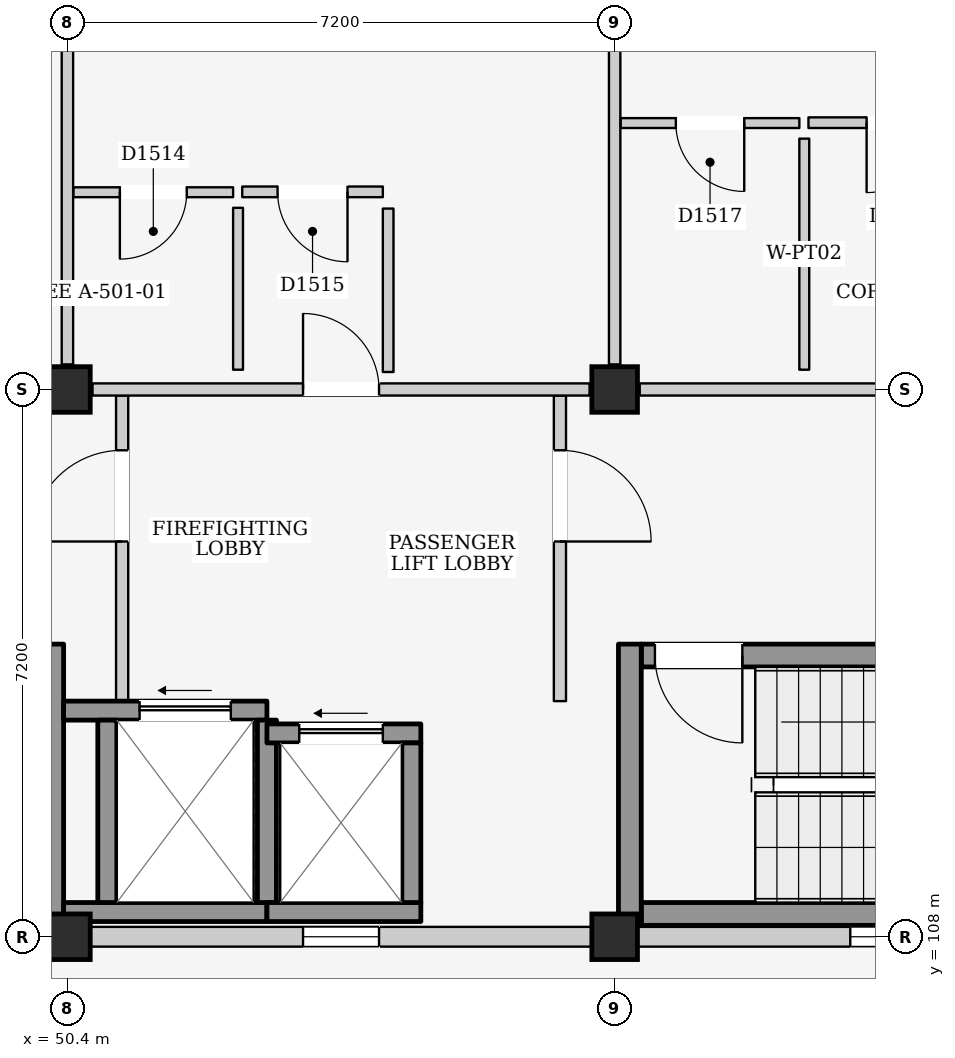
"""IFC4 building model, lengths in metres.
Left out: names, types, materials, properties, quantities, classifications, styles, units other than length and angle.
Written with IfcOpenShell. Run it as: python <this file> out.ifc"""

import sys

from ifc_helpers import new_model, si_unit, direction, frame, frame_2d, origin, origin_2d, place, context, subcontext, project, spatial, rectangle, extrude, element, fill, save


model = new_model("IFC4")
c1 = context("Model", 3, precision=1e-05, world=origin(), true_north=direction((0.0, 1.0)))
c2 = subcontext(c1, "Body", "Model", "MODEL_VIEW")
j1 = project(units=[si_unit("LENGTHUNIT", "METRE"), si_unit("PLANEANGLEUNIT", "RADIAN")], contexts=[c1])
p1 = place(None, origin())
s1 = spatial("IfcSite", under=j1, at=p1, CompositionType="ELEMENT")
p2 = place(p1, origin())
s2 = spatial("IfcBuilding", under=s1, at=p2, CompositionType="ELEMENT")
p3 = place(p2, frame((0.0, 0.0, 25.1)))
s3 = spatial("IfcBuildingStorey", under=s2, at=p3, CompositionType="ELEMENT", Elevation=25.1)
for number, where, z_axis, x_axis in (
    (1, (50.4, 108.0, 0.0), (0.0, 0.0, 1.0), (1.0, 0.0, 0.0)),
    (2, (50.4, 115.2, 0.0), (0.0, 0.0, 1.0), (1.0, 0.0, 0.0)),
    (3, (57.6, 108.0, 0.0), (0.0, 0.0, 1.0), (1.0, 0.0, 0.0)),
    (4, (57.6, 115.2, 0.0), (0.0, 0.0, 1.0), (1.0, 0.0, 0.0)),
):
    element("IfcColumn", number, at=place(p3, frame(where, z_axis=z_axis, x_axis=x_axis)), inside=s3, PredefinedType="COLUMN", context=c2, shape_type="SweptSolid", body=[
        extrude(rectangle(XDim=0.6, YDim=0.6, at=origin_2d()), origin(), (0.0, 0.0, 1.0), 3.2),
    ])
p4 = place(p3, frame((50.7, 108.0, 0.0), z_axis=(0.0, 0.0, 1.0), x_axis=(1.0, 0.0, 0.0)))
e5 = element("IfcWall", 5, at=p4, inside=s3, PredefinedType="ELEMENTEDWALL", context=c2, shape_type="SweptSolid", body=[
    extrude(rectangle(XDim=6.6, YDim=0.26, at=frame_2d((3.3, 0.0))), origin(), (0.0, 0.0, 1.0), 2.325),
])
p5 = place(p4, frame((2.8, 0.0, 1.2)))
e6 = element("IfcOpeningElement", 6, at=p5, cuts=e5, PredefinedType="OPENING", context=c2, shape_type="SweptSolid", body=[
    extrude(rectangle(XDim=1.0, YDim=0.9, at=frame_2d((0.5, 0.45))), frame((0.0, 0.145, 0.0), z_axis=(0.0, -1.0, 0.0), x_axis=(1.0, 0.0, 0.0)), (0.0, 0.0, 1.0), 0.29),
])
p6 = place(p3, frame((57.9, 108.0, 0.0), z_axis=(0.0, 0.0, 1.0), x_axis=(1.0, 0.0, 0.0)))
e7 = element("IfcWall", 7, at=p6, inside=s3, PredefinedType="ELEMENTEDWALL", context=c2, shape_type="SweptSolid", body=[
    extrude(rectangle(XDim=6.6, YDim=0.26, at=frame_2d((3.3, 0.0))), origin(), (0.0, 0.0, 1.0), 2.325),
])
p7 = place(p6, frame((2.8, 0.0, 1.2)))
e8 = element("IfcOpeningElement", 8, at=p7, cuts=e7, PredefinedType="OPENING", context=c2, shape_type="SweptSolid", body=[
    extrude(rectangle(XDim=1.0, YDim=0.9, at=frame_2d((0.5, 0.45))), frame((0.0, 0.145, 0.0), z_axis=(0.0, -1.0, 0.0), x_axis=(1.0, 0.0, 0.0)), (0.0, 0.0, 1.0), 0.29),
])
p8 = place(p3, frame((50.2, 108.15, 0.0), z_axis=(0.0, 0.0, 1.0), x_axis=(0.0, 1.0, 0.0)))
e9 = element("IfcWall", 9, at=p8, inside=s3, PredefinedType="SHEAR", context=c2, shape_type="SweptSolid", body=[
    extrude(rectangle(XDim=3.7, YDim=0.3, at=frame_2d((1.85, 0.0))), origin(), (0.0, 0.0, 1.0), 2.99),
])
p9 = place(p3, frame((51.12, 111.1, 0.0), z_axis=(0.0, 0.0, 1.0), x_axis=(0.0, 1.0, 0.0)))
e10 = element("IfcWall", 10, at=p9, inside=s3, PredefinedType="PARTITIONING", context=c2, shape_type="SweptSolid", body=[
    extrude(rectangle(XDim=4.02, YDim=0.16, at=frame_2d((2.01, 0.0))), origin(), (0.0, 0.0, 1.0), 2.99),
])
p10 = place(p9, frame((2.1, 0.0, 0.0)))
e11 = element("IfcOpeningElement", 11, at=p10, cuts=e10, PredefinedType="OPENING", context=c2, shape_type="SweptSolid", body=[
    extrude(rectangle(XDim=1.2, YDim=2.2, at=frame_2d((0.6, 1.1))), frame((0.0, 0.095, 0.0), z_axis=(0.0, -1.0, 0.0), x_axis=(1.0, 0.0, 0.0)), (0.0, 0.0, 1.0), 0.19),
])
p11 = place(p3, frame((56.88, 111.1, 0.0), z_axis=(0.0, 0.0, 1.0), x_axis=(0.0, 1.0, 0.0)))
e12 = element("IfcWall", 12, at=p11, inside=s3, PredefinedType="PARTITIONING", context=c2, shape_type="SweptSolid", body=[
    extrude(rectangle(XDim=4.02, YDim=0.16, at=frame_2d((2.01, 0.0))), origin(), (0.0, 0.0, 1.0), 2.99),
])
p12 = place(p11, frame((2.1, 0.0, 0.0)))
e13 = element("IfcOpeningElement", 13, at=p12, cuts=e12, PredefinedType="OPENING", context=c2, shape_type="SweptSolid", body=[
    extrude(rectangle(XDim=1.2, YDim=2.2, at=frame_2d((0.6, 1.1))), frame((0.0, 0.095, 0.0), z_axis=(0.0, -1.0, 0.0), x_axis=(1.0, 0.0, 0.0)), (0.0, 0.0, 1.0), 0.19),
])
p13 = place(p3, frame((50.35, 108.325, 0.0), z_axis=(0.0, 0.0, 1.0), x_axis=(1.0, 0.0, 0.0)))
e14 = element("IfcWall", 14, at=p13, inside=s3, PredefinedType="SHEAR", context=c2, shape_type="SweptSolid", body=[
    extrude(rectangle(XDim=2.675, YDim=0.25, at=frame_2d((1.337, 0.0))), origin(), (0.0, 0.0, 1.0), 2.99),
])
p14 = place(p3, frame((50.35, 110.975, 0.0), z_axis=(0.0, 0.0, 1.0), x_axis=(1.0, 0.0, 0.0)))
e15 = element("IfcWall", 15, at=p14, inside=s3, PredefinedType="SHEAR", context=c2, shape_type="SweptSolid", body=[
    extrude(rectangle(XDim=2.675, YDim=0.25, at=frame_2d((1.337, 0.0))), origin(), (0.0, 0.0, 1.0), 2.99),
])
p15 = place(p14, frame((1.0, 0.0, 0.0)))
e16 = element("IfcOpeningElement", 16, at=p15, cuts=e15, PredefinedType="OPENING", context=c2, shape_type="SweptSolid", body=[
    extrude(rectangle(XDim=1.2, YDim=2.25, at=frame_2d((0.6, 1.125))), frame((0.0, 0.14, 0.0), z_axis=(0.0, -1.0, 0.0), x_axis=(1.0, 0.0, 0.0)), (0.0, 0.0, 1.0), 0.28),
])
for number, where, z_axis, x_axis in (
    (17, (50.925, 108.45, 0.0), (0.0, 0.0, 1.0), (0.0, 1.0, 0.0)),
    (18, (53.025, 108.45, 0.0), (0.0, 0.0, 1.0), (0.0, 1.0, 0.0)),
):
    element("IfcWall", number, at=place(p3, frame(where, z_axis=z_axis, x_axis=x_axis)), inside=s3, PredefinedType="SHEAR", context=c2, shape_type="SweptSolid", body=[
        extrude(rectangle(XDim=2.4, YDim=0.25, at=frame_2d((1.2, 0.0))), origin(), (0.0, 0.0, 1.0), 2.99),
    ])
p16 = place(p3, frame((53.025, 108.325, 0.0), z_axis=(0.0, 0.0, 1.0), x_axis=(1.0, 0.0, 0.0)))
e19 = element("IfcWall", 19, at=p16, inside=s3, PredefinedType="SHEAR", context=c2, shape_type="SweptSolid", body=[
    extrude(rectangle(XDim=2.025, YDim=0.25, at=frame_2d((1.013, 0.0))), origin(), (0.0, 0.0, 1.0), 2.99),
])
p17 = place(p3, frame((53.025, 110.675, 0.0), z_axis=(0.0, 0.0, 1.0), x_axis=(1.0, 0.0, 0.0)))
e20 = element("IfcWall", 20, at=p17, inside=s3, PredefinedType="SHEAR", context=c2, shape_type="SweptSolid", body=[
    extrude(rectangle(XDim=2.025, YDim=0.25, at=frame_2d((1.013, 0.0))), origin(), (0.0, 0.0, 1.0), 2.99),
])
p18 = place(p17, frame((0.425, 0.0, 0.0)))
e21 = element("IfcOpeningElement", 21, at=p18, cuts=e20, PredefinedType="OPENING", context=c2, shape_type="SweptSolid", body=[
    extrude(rectangle(XDim=1.1, YDim=2.15, at=frame_2d((0.55, 1.075))), frame((0.0, 0.14, 0.0), z_axis=(0.0, -1.0, 0.0), x_axis=(1.0, 0.0, 0.0)), (0.0, 0.0, 1.0), 0.28),
])
p19 = place(p3, frame((54.925, 108.45, 0.0), z_axis=(0.0, 0.0, 1.0), x_axis=(0.0, 1.0, 0.0)))
e22 = element("IfcWall", 22, at=p19, inside=s3, PredefinedType="SHEAR", context=c2, shape_type="SweptSolid", body=[
    extrude(rectangle(XDim=2.1, YDim=0.25, at=frame_2d((1.05, 0.0))), origin(), (0.0, 0.0, 1.0), 2.99),
])
p20 = place(p3, frame((57.95, 108.3, 0.0), z_axis=(0.0, 0.0, 1.0), x_axis=(1.0, 0.0, 0.0)))
e23 = element("IfcWall", 23, at=p20, inside=s3, PredefinedType="SHEAR", context=c2, shape_type="SweptSolid", body=[
    extrude(rectangle(XDim=6.5, YDim=0.3, at=frame_2d((3.25, 0.0))), origin(), (0.0, 0.0, 1.0), 2.99),
])
p21 = place(p3, frame((57.95, 111.7, 0.0), z_axis=(0.0, 0.0, 1.0), x_axis=(1.0, 0.0, 0.0)))
e24 = element("IfcWall", 24, at=p21, inside=s3, PredefinedType="SHEAR", context=c2, shape_type="SweptSolid", body=[
    extrude(rectangle(XDim=6.5, YDim=0.3, at=frame_2d((3.25, 0.0))), origin(), (0.0, 0.0, 1.0), 2.99),
])
p22 = place(p21, frame((0.18, 0.0, 0.0)))
e25 = element("IfcOpeningElement", 25, at=p22, cuts=e24, PredefinedType="OPENING", context=c2, shape_type="SweptSolid", body=[
    extrude(rectangle(XDim=1.15, YDim=2.2, at=frame_2d((0.575, 1.1))), frame((0.0, 0.165, 0.0), z_axis=(0.0, -1.0, 0.0), x_axis=(1.0, 0.0, 0.0)), (0.0, 0.0, 1.0), 0.33),
])
p23 = place(p3, frame((57.8, 108.15, 0.0), z_axis=(0.0, 0.0, 1.0), x_axis=(0.0, 1.0, 0.0)))
e26 = element("IfcWall", 26, at=p23, inside=s3, PredefinedType="SHEAR", context=c2, shape_type="SweptSolid", body=[
    extrude(rectangle(XDim=3.7, YDim=0.3, at=frame_2d((1.85, 0.0))), origin(), (0.0, 0.0, 1.0), 2.99),
])
p24 = place(p3, frame((50.4, 115.53, 0.0), z_axis=(0.0, 0.0, 1.0), x_axis=(0.0, 1.0, 0.0)))
e27 = element("IfcWall", 27, at=p24, inside=s3, PredefinedType="PARTITIONING", context=c2, shape_type="SweptSolid", body=[
    extrude(rectangle(XDim=6.54, YDim=0.15, at=frame_2d((3.27, 0.0))), origin(), (0.0, 0.0, 1.0), 2.475),
])
p25 = place(p3, frame((50.73, 115.2, 0.0), z_axis=(0.0, 0.0, 1.0), x_axis=(1.0, 0.0, 0.0)))
e28 = element("IfcWall", 28, at=p25, inside=s3, PredefinedType="PARTITIONING", context=c2, shape_type="SweptSolid", body=[
    extrude(rectangle(XDim=6.54, YDim=0.16, at=frame_2d((3.27, 0.0))), origin(), (0.0, 0.0, 1.0), 2.325),
])
p26 = place(p25, frame((2.77, 0.0, 0.0)))
e29 = element("IfcOpeningElement", 29, at=p26, cuts=e28, PredefinedType="OPENING", context=c2, shape_type="SweptSolid", body=[
    extrude(rectangle(XDim=1.0, YDim=2.15, at=frame_2d((0.5, 1.075))), frame((0.0, 0.095, 0.0), z_axis=(0.0, -1.0, 0.0), x_axis=(1.0, 0.0, 0.0)), (0.0, 0.0, 1.0), 0.19),
])
p27 = place(p3, frame((57.6, 115.53, 0.0), z_axis=(0.0, 0.0, 1.0), x_axis=(0.0, 1.0, 0.0)))
e30 = element("IfcWall", 30, at=p27, inside=s3, PredefinedType="PARTITIONING", context=c2, shape_type="SweptSolid", body=[
    extrude(rectangle(XDim=6.54, YDim=0.15, at=frame_2d((3.27, 0.0))), origin(), (0.0, 0.0, 1.0), 2.475),
])
p28 = place(p3, frame((50.48, 117.795, 0.0), z_axis=(0.0, 0.0, 1.0), x_axis=(1.0, 0.0, 0.0)))
e31 = element("IfcWall", 31, at=p28, inside=s3, PredefinedType="PARTITIONING", context=c2, shape_type="SweptSolid", body=[
    extrude(rectangle(XDim=2.1, YDim=0.13, at=frame_2d((1.05, 0.0))), origin(), (0.0, 0.0, 1.0), 2.99),
])
p29 = place(p28, frame((0.61, 0.0, 0.0)))
e32 = element("IfcOpeningElement", 32, at=p29, cuts=e31, PredefinedType="OPENING", context=c2, shape_type="SweptSolid", body=[
    extrude(rectangle(XDim=0.88, YDim=2.1, at=frame_2d((0.44, 1.05))), frame((0.0, 0.08, 0.0), z_axis=(0.0, -1.0, 0.0), x_axis=(1.0, 0.0, 0.0)), (0.0, 0.0, 1.0), 0.16),
])
p30 = place(p3, frame((52.645, 115.46, 0.0), z_axis=(0.0, 0.0, 1.0), x_axis=(0.0, 1.0, 0.0)))
e33 = element("IfcWall", 33, at=p30, inside=s3, PredefinedType="PARTITIONING", context=c2, shape_type="SweptSolid", body=[
    extrude(rectangle(XDim=2.13, YDim=0.13, at=frame_2d((1.065, 0.0))), origin(), (0.0, 0.0, 1.0), 2.99),
])
p31 = place(p3, frame((52.7, 117.8, 0.0), z_axis=(0.0, 0.0, 1.0), x_axis=(1.0, 0.0, 0.0)))
e34 = element("IfcWall", 34, at=p31, inside=s3, PredefinedType="PARTITIONING", context=c2, shape_type="SweptSolid", body=[
    extrude(rectangle(XDim=1.85, YDim=0.14, at=frame_2d((0.925, 0.0))), origin(), (0.0, 0.0, 1.0), 2.99),
])
p32 = place(p31, frame((0.465, 0.0, 0.0)))
e35 = element("IfcOpeningElement", 35, at=p32, cuts=e34, PredefinedType="OPENING", context=c2, shape_type="SweptSolid", body=[
    extrude(rectangle(XDim=0.92, YDim=2.1, at=frame_2d((0.46, 1.05))), frame((0.0, 0.085, 0.0), z_axis=(0.0, -1.0, 0.0), x_axis=(1.0, 0.0, 0.0)), (0.0, 0.0, 1.0), 0.17),
])
p33 = place(p3, frame((54.62, 115.43, 0.0), z_axis=(0.0, 0.0, 1.0), x_axis=(0.0, 1.0, 0.0)))
e36 = element("IfcWall", 36, at=p33, inside=s3, PredefinedType="PARTITIONING", context=c2, shape_type="SweptSolid", body=[
    extrude(rectangle(XDim=2.15, YDim=0.14, at=frame_2d((1.075, 0.0))), origin(), (0.0, 0.0, 1.0), 2.99),
])
p34 = place(p3, frame((57.93, 115.2, 0.0), z_axis=(0.0, 0.0, 1.0), x_axis=(1.0, 0.0, 0.0)))
e37 = element("IfcWall", 37, at=p34, inside=s3, PredefinedType="PARTITIONING", context=c2, shape_type="SweptSolid", body=[
    extrude(rectangle(XDim=6.54, YDim=0.16, at=frame_2d((3.27, 0.0))), origin(), (0.0, 0.0, 1.0), 2.325),
])
p35 = place(p34, frame((5.27, 0.0, 0.0)))
e38 = element("IfcOpeningElement", 38, at=p35, cuts=e37, PredefinedType="OPENING", context=c2, shape_type="SweptSolid", body=[
    extrude(rectangle(XDim=1.0, YDim=2.15, at=frame_2d((0.5, 1.075))), frame((0.0, 0.095, 0.0), z_axis=(0.0, -1.0, 0.0), x_axis=(1.0, 0.0, 0.0)), (0.0, 0.0, 1.0), 0.19),
])
p36 = place(p3, frame((57.68, 118.705, 0.0), z_axis=(0.0, 0.0, 1.0), x_axis=(1.0, 0.0, 0.0)))
e39 = element("IfcWall", 39, at=p36, inside=s3, PredefinedType="PARTITIONING", context=c2, shape_type="SweptSolid", body=[
    extrude(rectangle(XDim=2.35, YDim=0.13, at=frame_2d((1.175, 0.0))), origin(), (0.0, 0.0, 1.0), 2.99),
])
p37 = place(p36, frame((0.725, 0.0, 0.0)))
e40 = element("IfcOpeningElement", 40, at=p37, cuts=e39, PredefinedType="OPENING", context=c2, shape_type="SweptSolid", body=[
    extrude(rectangle(XDim=0.9, YDim=2.1, at=frame_2d((0.45, 1.05))), frame((0.0, 0.08, 0.0), z_axis=(0.0, -1.0, 0.0), x_axis=(1.0, 0.0, 0.0)), (0.0, 0.0, 1.0), 0.16),
])
p38 = place(p3, frame((60.095, 115.46, 0.0), z_axis=(0.0, 0.0, 1.0), x_axis=(0.0, 1.0, 0.0)))
e41 = element("IfcWall", 41, at=p38, inside=s3, PredefinedType="PARTITIONING", context=c2, shape_type="SweptSolid", body=[
    extrude(rectangle(XDim=3.04, YDim=0.13, at=frame_2d((1.52, 0.0))), origin(), (0.0, 0.0, 1.0), 2.99),
])
p39 = place(p3, frame((60.15, 118.71, 0.0), z_axis=(0.0, 0.0, 1.0), x_axis=(1.0, 0.0, 0.0)))
e42 = element("IfcWall", 42, at=p39, inside=s3, PredefinedType="PARTITIONING", context=c2, shape_type="SweptSolid", body=[
    extrude(rectangle(XDim=2.45, YDim=0.14, at=frame_2d((1.225, 0.0))), origin(), (0.0, 0.0, 1.0), 2.99),
])
p40 = place(p39, frame((0.765, 0.0, 0.0)))
e43 = element("IfcOpeningElement", 43, at=p40, cuts=e42, PredefinedType="OPENING", context=c2, shape_type="SweptSolid", body=[
    extrude(rectangle(XDim=0.92, YDim=2.1, at=frame_2d((0.46, 1.05))), frame((0.0, 0.085, 0.0), z_axis=(0.0, -1.0, 0.0), x_axis=(1.0, 0.0, 0.0)), (0.0, 0.0, 1.0), 0.17),
])
p41 = place(p5, origin())
e44 = element("IfcWindow", 44, at=p41, inside=s3, PartitioningType="SINGLE_PANEL", PredefinedType="WINDOW", context=c2, shape_type="SweptSolid", body=[
    extrude(rectangle(XDim=1.0, YDim=0.9, at=frame_2d((0.5, 0.45))), frame((0.0, 0.03, 0.0), z_axis=(0.0, -1.0, 0.0), x_axis=(1.0, 0.0, 0.0)), (0.0, 0.0, 1.0), 0.06),
])
fill(e6, e44)
p42 = place(p7, origin())
e45 = element("IfcWindow", 45, at=p42, inside=s3, PartitioningType="SINGLE_PANEL", PredefinedType="WINDOW", context=c2, shape_type="SweptSolid", body=[
    extrude(rectangle(XDim=1.0, YDim=0.9, at=frame_2d((0.5, 0.45))), frame((0.0, 0.03, 0.0), z_axis=(0.0, -1.0, 0.0), x_axis=(1.0, 0.0, 0.0)), (0.0, 0.0, 1.0), 0.06),
])
fill(e8, e45)
p43 = place(p10, origin())
e46 = element("IfcDoor", 46, at=p43, inside=s3, OperationType="SINGLE_SWING_LEFT", PredefinedType="DOOR", context=c2, shape_type="SweptSolid", body=[
    extrude(rectangle(XDim=1.2, YDim=2.2, at=frame_2d((0.6, 1.1))), frame((0.0, 0.025, 0.0), z_axis=(0.0, -1.0, 0.0), x_axis=(1.0, 0.0, 0.0)), (0.0, 0.0, 1.0), 0.05),
])
fill(e11, e46)
p44 = place(p12, frame((1.2, 0.0, 0.0), z_axis=(0.0, 0.0, 1.0), x_axis=(-1.0, 0.0, 0.0)))
e47 = element("IfcDoor", 47, at=p44, inside=s3, OperationType="SINGLE_SWING_RIGHT", PredefinedType="DOOR", context=c2, shape_type="SweptSolid", body=[
    extrude(rectangle(XDim=1.2, YDim=2.2, at=frame_2d((0.6, 1.1))), frame((0.0, 0.025, 0.0), z_axis=(0.0, -1.0, 0.0), x_axis=(1.0, 0.0, 0.0)), (0.0, 0.0, 1.0), 0.05),
])
fill(e13, e47)
p45 = place(p15, origin())
e48 = element("IfcDoor", 48, at=p45, inside=s3, OperationType="SLIDING_TO_LEFT", PredefinedType="DOOR", context=c2, shape_type="SweptSolid", body=[
    extrude(rectangle(XDim=1.2, YDim=2.25, at=frame_2d((0.6, 1.125))), frame((0.0, 0.025, 0.0), z_axis=(0.0, -1.0, 0.0), x_axis=(1.0, 0.0, 0.0)), (0.0, 0.0, 1.0), 0.05),
])
fill(e16, e48)
p46 = place(p18, origin())
e49 = element("IfcDoor", 49, at=p46, inside=s3, OperationType="SLIDING_TO_LEFT", PredefinedType="DOOR", context=c2, shape_type="SweptSolid", body=[
    extrude(rectangle(XDim=1.1, YDim=2.15, at=frame_2d((0.55, 1.075))), frame((0.0, 0.025, 0.0), z_axis=(0.0, -1.0, 0.0), x_axis=(1.0, 0.0, 0.0)), (0.0, 0.0, 1.0), 0.05),
])
fill(e21, e49)
p47 = place(p22, frame((1.15, 0.0, 0.0), z_axis=(0.0, 0.0, 1.0), x_axis=(-1.0, 0.0, 0.0)))
e50 = element("IfcDoor", 50, at=p47, inside=s3, OperationType="SINGLE_SWING_LEFT", PredefinedType="DOOR", context=c2, shape_type="SweptSolid", body=[
    extrude(rectangle(XDim=1.15, YDim=2.2, at=frame_2d((0.575, 1.1))), frame((0.0, 0.025, 0.0), z_axis=(0.0, -1.0, 0.0), x_axis=(1.0, 0.0, 0.0)), (0.0, 0.0, 1.0), 0.05),
])
fill(e25, e50)
p48 = place(p26, origin())
e51 = element("IfcDoor", 51, at=p48, inside=s3, OperationType="SINGLE_SWING_LEFT", PredefinedType="DOOR", context=c2, shape_type="SweptSolid", body=[
    extrude(rectangle(XDim=1.0, YDim=2.15, at=frame_2d((0.5, 1.075))), frame((0.0, 0.025, 0.0), z_axis=(0.0, -1.0, 0.0), x_axis=(1.0, 0.0, 0.0)), (0.0, 0.0, 1.0), 0.05),
])
fill(e29, e51)
p49 = place(p29, frame((0.88, 0.0, 0.0), z_axis=(0.0, 0.0, 1.0), x_axis=(-1.0, 0.0, 0.0)))
e52 = element("IfcDoor", 52, at=p49, inside=s3, OperationType="SINGLE_SWING_RIGHT", PredefinedType="DOOR", context=c2, shape_type="SweptSolid", body=[
    extrude(rectangle(XDim=0.88, YDim=2.1, at=frame_2d((0.44, 1.05))), frame((0.0, 0.025, 0.0), z_axis=(0.0, -1.0, 0.0), x_axis=(1.0, 0.0, 0.0)), (0.0, 0.0, 1.0), 0.05),
])
fill(e32, e52)
p50 = place(p32, frame((0.92, 0.0, 0.0), z_axis=(0.0, 0.0, 1.0), x_axis=(-1.0, 0.0, 0.0)))
e53 = element("IfcDoor", 53, at=p50, inside=s3, OperationType="SINGLE_SWING_LEFT", PredefinedType="DOOR", context=c2, shape_type="SweptSolid", body=[
    extrude(rectangle(XDim=0.92, YDim=2.1, at=frame_2d((0.46, 1.05))), frame((0.0, 0.025, 0.0), z_axis=(0.0, -1.0, 0.0), x_axis=(1.0, 0.0, 0.0)), (0.0, 0.0, 1.0), 0.05),
])
fill(e35, e53)
p51 = place(p37, frame((0.9, 0.0, 0.0), z_axis=(0.0, 0.0, 1.0), x_axis=(-1.0, 0.0, 0.0)))
e54 = element("IfcDoor", 54, at=p51, inside=s3, OperationType="SINGLE_SWING_LEFT", PredefinedType="DOOR", context=c2, shape_type="SweptSolid", body=[
    extrude(rectangle(XDim=0.9, YDim=2.1, at=frame_2d((0.45, 1.05))), frame((0.0, 0.025, 0.0), z_axis=(0.0, -1.0, 0.0), x_axis=(1.0, 0.0, 0.0)), (0.0, 0.0, 1.0), 0.05),
])
fill(e40, e54)
p52 = place(p40, frame((0.92, 0.0, 0.0), z_axis=(0.0, 0.0, 1.0), x_axis=(-1.0, 0.0, 0.0)))
e55 = element("IfcDoor", 55, at=p52, inside=s3, OperationType="SINGLE_SWING_RIGHT", PredefinedType="DOOR", context=c2, shape_type="SweptSolid", body=[
    extrude(rectangle(XDim=0.92, YDim=2.1, at=frame_2d((0.46, 1.05))), frame((0.0, 0.025, 0.0), z_axis=(0.0, -1.0, 0.0), x_axis=(1.0, 0.0, 0.0)), (0.0, 0.0, 1.0), 0.05),
])
fill(e43, e55)
save(model, sys.argv[1])
